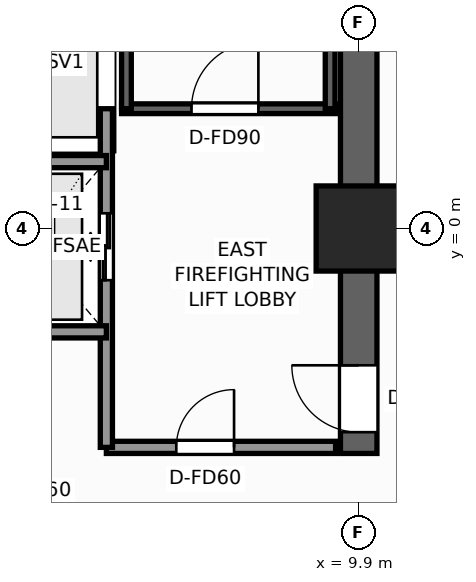
"""IFC4 building model, lengths in metres.
Left out: names, types, materials, properties, quantities, classifications, styles, units other than length and angle.
Written with IfcOpenShell. Run it as: python <this file> out.ifc"""

import sys

from ifc_helpers import new_model, si_unit, direction, frame, frame_2d, origin, origin_2d, place, context, subcontext, project, spatial, rectangle, extrude, element, fill, save


model = new_model("IFC4")
c1 = context("Model", 3, precision=1e-05, world=origin(), true_north=direction((0.0, 1.0)))
c2 = subcontext(c1, "Body", "Model", "MODEL_VIEW")
j1 = project(units=[si_unit("LENGTHUNIT", "METRE"), si_unit("PLANEANGLEUNIT", "RADIAN")], contexts=[c1])
p1 = place(None, origin())
s1 = spatial("IfcSite", under=j1, at=p1, CompositionType="ELEMENT")
p2 = place(p1, origin())
s2 = spatial("IfcBuilding", under=s1, at=p2, CompositionType="ELEMENT")
p3 = place(p2, frame((0.0, 0.0, 33.7)))
s3 = spatial("IfcBuildingStorey", under=s2, at=p3, CompositionType="ELEMENT", Elevation=33.7)
p4 = place(p3, frame((9.9, -3.7, 0.0), z_axis=(0.0, 0.0, 1.0), x_axis=(0.0, 1.0, 0.0)))
e1 = element("IfcWall", 1, at=p4, inside=s3, PredefinedType="SHEAR", context=c2, shape_type="SweptSolid", body=[
    extrude(rectangle(XDim=13.3, YDim=0.6, at=frame_2d((6.65, 0.0))), origin(), (0.0, 0.0, 1.0), 3.3),
])
p5 = place(p4, frame((0.35, 0.0, 0.0)))
e2 = element("IfcOpeningElement", 2, at=p5, cuts=e1, PredefinedType="OPENING", context=c2, shape_type="SweptSolid", body=[
    extrude(rectangle(XDim=1.1, YDim=2.2, at=frame_2d((0.55, 1.1))), frame((0.0, 0.31, 0.0), z_axis=(0.0, -1.0, 0.0), x_axis=(1.0, 0.0, 0.0)), (0.0, 0.0, 1.0), 0.62),
])
p6 = place(p3, frame((9.9, 0.0, 0.0), z_axis=(0.0, 0.0, 1.0), x_axis=(1.0, 0.0, 0.0)))
e3 = element("IfcColumn", 3, at=p6, inside=s3, PredefinedType="COLUMN", context=c2, shape_type="SweptSolid", body=[
    extrude(rectangle(XDim=1.4, YDim=1.4, at=origin_2d()), origin(), (0.0, 0.0, 1.0), 3.3),
])
p7 = place(p3, frame((6.0, 1.97, 0.0), z_axis=(0.0, 0.0, 1.0), x_axis=(1.0, 0.0, 0.0)))
e4 = element("IfcWall", 4, at=p7, inside=s3, PredefinedType="SHEAR", context=c2, shape_type="SweptSolid", body=[
    extrude(rectangle(XDim=3.52, YDim=0.16, at=frame_2d((1.76, 0.0))), origin(), (0.0, 0.0, 1.0), 3.3),
])
p8 = place(p7, frame((1.15, 0.0, 0.0)))
e5 = element("IfcOpeningElement", 5, at=p8, cuts=e4, PredefinedType="OPENING", context=c2, shape_type="SweptSolid", body=[
    extrude(rectangle(XDim=1.1, YDim=2.2, at=frame_2d((0.55, 1.1))), frame((0.0, 0.09, 0.0), z_axis=(0.0, -1.0, 0.0), x_axis=(1.0, 0.0, 0.0)), (0.0, 0.0, 1.0), 0.18),
])
for number, where, z_axis, x_axis in (
    (6, (6.08, 1.97, 0.0), (0.0, 0.0, 1.0), (0.0, 1.0, 0.0)),
    (7, (9.43, 1.97, 0.0), (0.0, 0.0, 1.0), (0.0, 1.0, 0.0)),
):
    element("IfcWall", number, at=place(p3, frame(where, z_axis=z_axis, x_axis=x_axis)), inside=s3, PredefinedType="SHEAR", context=c2, shape_type="SweptSolid", body=[
        extrude(rectangle(XDim=7.56, YDim=0.16, at=frame_2d((3.78, 0.0))), origin(), (0.0, 0.0, 1.0), 3.3),
    ])
p9 = place(p3, frame((5.75, -3.6, 0.0), z_axis=(0.0, 0.0, 1.0), x_axis=(1.0, 0.0, 0.0)))
e8 = element("IfcWall", 8, at=p9, inside=s3, PredefinedType="SOLIDWALL", context=c2, shape_type="SweptSolid", body=[
    extrude(rectangle(XDim=3.77, YDim=0.2, at=frame_2d((1.885, 0.0))), origin(), (0.0, 0.0, 1.0), 3.06),
])
p10 = place(p9, frame((1.15, 0.0, 0.0)))
e9 = element("IfcOpeningElement", 9, at=p10, cuts=e8, PredefinedType="OPENING", context=c2, shape_type="SweptSolid", body=[
    extrude(rectangle(XDim=0.95, YDim=2.06, at=frame_2d((0.475, 1.03))), frame((0.0, 0.11, 0.0), z_axis=(0.0, -1.0, 0.0), x_axis=(1.0, 0.0, 0.0)), (0.0, 0.0, 1.0), 0.22),
])
p11 = place(p3, frame((5.75, -3.6, 0.0), z_axis=(0.0, 0.0, 1.0), x_axis=(0.0, 1.0, 0.0)))
e10 = element("IfcWall", 10, at=p11, inside=s3, PredefinedType="SOLIDWALL", context=c2, shape_type="SweptSolid", body=[
    extrude(rectangle(XDim=5.57, YDim=0.2, at=frame_2d((2.785, 0.0))), origin(), (0.0, 0.0, 1.0), 3.06),
])
p12 = place(p11, frame((2.75, 0.0, 0.0)))
e11 = element("IfcOpeningElement", 11, at=p12, cuts=e10, PredefinedType="OPENING", context=c2, shape_type="SweptSolid", body=[
    extrude(rectangle(XDim=1.1, YDim=2.2, at=frame_2d((0.55, 1.1))), frame((0.0, 0.11, 0.0), z_axis=(0.0, -1.0, 0.0), x_axis=(1.0, 0.0, 0.0)), (0.0, 0.0, 1.0), 0.22),
])
for number, where, z_axis, x_axis in (
    (12, (3.35, -1.7, 0.0), (0.0, 0.0, 1.0), (1.0, 0.0, 0.0)),
    (13, (3.35, 1.1, 0.0), (0.0, 0.0, 1.0), (1.0, 0.0, 0.0)),
):
    element("IfcWall", number, at=place(p3, frame(where, z_axis=z_axis, x_axis=x_axis)), inside=s3, PredefinedType="SOLIDWALL", context=c2, shape_type="SweptSolid", body=[
        extrude(rectangle(XDim=2.4, YDim=0.2, at=frame_2d((1.2, 0.0))), origin(), (0.0, 0.0, 1.0), 3.06),
    ])
p13 = place(p8, origin())
e14 = element("IfcDoor", 14, at=p13, inside=s3, OperationType="SINGLE_SWING_RIGHT", PredefinedType="DOOR", context=c2, shape_type="SweptSolid", body=[
    extrude(rectangle(XDim=1.1, YDim=2.2, at=frame_2d((0.55, 1.1))), frame((0.0, 0.025, 0.0), z_axis=(0.0, -1.0, 0.0), x_axis=(1.0, 0.0, 0.0)), (0.0, 0.0, 1.0), 0.05),
])
fill(e5, e14)
p14 = place(p5, origin())
e15 = element("IfcDoor", 15, at=p14, inside=s3, OperationType="SINGLE_SWING_RIGHT", PredefinedType="DOOR", context=c2, shape_type="SweptSolid", body=[
    extrude(rectangle(XDim=1.1, YDim=2.2, at=frame_2d((0.55, 1.1))), frame((0.0, 0.025, 0.0), z_axis=(0.0, -1.0, 0.0), x_axis=(1.0, 0.0, 0.0)), (0.0, 0.0, 1.0), 0.05),
])
fill(e2, e15)
p15 = place(p12, origin())
e16 = element("IfcDoor", 16, at=p15, inside=s3, OperationType="DOUBLE_DOOR_SLIDING", PredefinedType="DOOR", context=c2, shape_type="SweptSolid", body=[
    extrude(rectangle(XDim=1.1, YDim=2.2, at=frame_2d((0.55, 1.1))), frame((0.0, 0.025, 0.0), z_axis=(0.0, -1.0, 0.0), x_axis=(1.0, 0.0, 0.0)), (0.0, 0.0, 1.0), 0.05),
])
fill(e11, e16)
p16 = place(p10, origin())
e17 = element("IfcDoor", 17, at=p16, inside=s3, OperationType="SINGLE_SWING_RIGHT", PredefinedType="DOOR", context=c2, shape_type="SweptSolid", body=[
    extrude(rectangle(XDim=0.95, YDim=2.06, at=frame_2d((0.475, 1.03))), frame((0.0, 0.025, 0.0), z_axis=(0.0, -1.0, 0.0), x_axis=(1.0, 0.0, 0.0)), (0.0, 0.0, 1.0), 0.05),
])
fill(e9, e17)
save(model, sys.argv[1])
